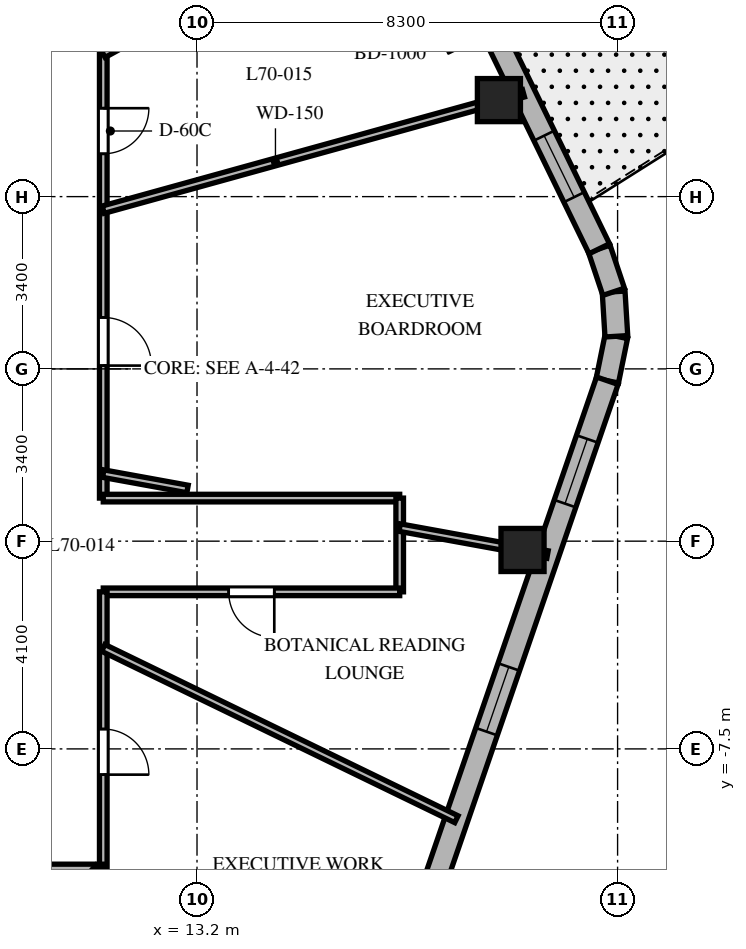
"""IFC4 building model, lengths in metres.
Left out: names, types, materials, properties, quantities, classifications, styles, units other than length and angle.
Written with IfcOpenShell. Run it as: python <this file> out.ifc"""

import sys

from ifc_helpers import new_model, si_unit, direction, frame, frame_2d, origin, origin_2d, place, context, subcontext, project, spatial, rectangle, extrude, element, fill, save


model = new_model("IFC4")
c1 = context("Model", 3, precision=1e-05, world=origin(), true_north=direction((0.0, 1.0)))
c2 = subcontext(c1, "Body", "Model", "MODEL_VIEW")
j1 = project(units=[si_unit("LENGTHUNIT", "METRE"), si_unit("PLANEANGLEUNIT", "RADIAN")], contexts=[c1])
p1 = place(None, origin())
s1 = spatial("IfcSite", under=j1, at=p1, CompositionType="ELEMENT")
p2 = place(p1, origin())
s2 = spatial("IfcBuilding", under=s1, at=p2, CompositionType="ELEMENT")
p3 = place(p2, frame((0.0, 0.0, 280.8)))
s3 = spatial("IfcBuildingStorey", under=s2, at=p3, CompositionType="ELEMENT", Elevation=280.8)
for number, where, z_axis, x_axis in (
    (1, (19.624, -3.574, 0.0), (0.0, 0.0, 1.0), (1.0, 0.0, 0.0)),
    (2, (19.158, 5.305, 0.0), (0.0, 0.0, 1.0), (1.0, 0.0, 0.0)),
):
    element("IfcColumn", number, at=place(p3, frame(where, z_axis=z_axis, x_axis=x_axis)), inside=s3, PredefinedType="COLUMN", context=c2, shape_type="SweptSolid", body=[
        extrude(rectangle(XDim=0.85, YDim=0.85, at=origin_2d()), origin(), (0.0, 0.0, 1.0), 3.9),
    ])
p4 = place(p3, frame((21.298, -0.233, 0.0), z_axis=(0.0, 0.0, 1.0), x_axis=(0.199158176661, 0.979967356941, 0.0)))
e3 = element("IfcWall", 3, at=p4, inside=s3, PredefinedType="SOLIDWALL", context=c2, shape_type="SweptSolid", body=[
    extrude(rectangle(XDim=0.895, YDim=0.45, at=frame_2d((0.447, 0.0))), origin(), (0.0, 0.0, 1.0), 3.6),
])
p5 = place(p3, frame((21.476, 0.644, 0.0), z_axis=(0.0, 0.0, 1.0), x_axis=(-0.061031097918, 0.998135865044, 0.0)))
e4 = element("IfcWall", 4, at=p5, inside=s3, PredefinedType="SOLIDWALL", context=c2, shape_type="SweptSolid", body=[
    extrude(rectangle(XDim=0.88, YDim=0.45, at=frame_2d((0.44, 0.0))), origin(), (0.0, 0.0, 1.0), 3.6),
])
p6 = place(p3, frame((21.422, 1.522, 0.0), z_axis=(0.0, 0.0, 1.0), x_axis=(-0.316964162323, 0.94843751497, 0.0)))
e5 = element("IfcWall", 5, at=p6, inside=s3, PredefinedType="SOLIDWALL", context=c2, shape_type="SweptSolid", body=[
    extrude(rectangle(XDim=0.895, YDim=0.45, at=frame_2d((0.448, 0.0))), origin(), (0.0, 0.0, 1.0), 3.6),
])
p7 = place(p3, frame((15.26, -17.776, 0.0), z_axis=(0.0, 0.0, 1.0), x_axis=(0.325407437101, 0.945573899745, 0.0)))
e6 = element("IfcWall", 6, at=p7, inside=s3, PredefinedType="SOLIDWALL", context=c2, shape_type="SweptSolid", body=[
    extrude(rectangle(XDim=18.552, YDim=0.45, at=frame_2d((9.276, 0.0))), origin(), (0.0, 0.0, 1.0), 3.6),
])
p8 = place(p7, frame((1.161, 0.0, 0.8)))
e7 = element("IfcOpeningElement", 7, at=p8, cuts=e6, PredefinedType="OPENING", context=c2, shape_type="SweptSolid", body=[
    extrude(rectangle(XDim=1.35, YDim=1.75, at=frame_2d((0.675, 0.875))), frame((0.0, 0.235, 0.0), z_axis=(0.0, -1.0, 0.0), x_axis=(1.0, 0.0, 0.0)), (0.0, 0.0, 1.0), 0.47),
])
p9 = place(p7, frame((6.046, 0.0, 0.8)))
e8 = element("IfcOpeningElement", 8, at=p9, cuts=e6, PredefinedType="OPENING", context=c2, shape_type="SweptSolid", body=[
    extrude(rectangle(XDim=1.35, YDim=1.75, at=frame_2d((0.675, 0.875))), frame((0.0, 0.235, 0.0), z_axis=(0.0, -1.0, 0.0), x_axis=(1.0, 0.0, 0.0)), (0.0, 0.0, 1.0), 0.47),
])
p10 = place(p7, frame((11.228, 0.0, 0.8)))
e9 = element("IfcOpeningElement", 9, at=p10, cuts=e6, PredefinedType="OPENING", context=c2, shape_type="SweptSolid", body=[
    extrude(rectangle(XDim=1.35, YDim=1.75, at=frame_2d((0.675, 0.875))), frame((0.0, 0.235, 0.0), z_axis=(0.0, -1.0, 0.0), x_axis=(1.0, 0.0, 0.0)), (0.0, 0.0, 1.0), 0.47),
])
p11 = place(p7, frame((15.987, 0.0, 0.8)))
e10 = element("IfcOpeningElement", 10, at=p11, cuts=e6, PredefinedType="OPENING", context=c2, shape_type="SweptSolid", body=[
    extrude(rectangle(XDim=1.35, YDim=1.75, at=frame_2d((0.675, 0.875))), frame((0.0, 0.235, 0.0), z_axis=(0.0, -1.0, 0.0), x_axis=(1.0, 0.0, 0.0)), (0.0, 0.0, 1.0), 0.47),
])
p12 = place(p3, frame((21.138, 2.371, 0.0), z_axis=(0.0, 0.0, 1.0), x_axis=(-0.438128124058, 0.89891253574, 0.0)))
e11 = element("IfcWall", 11, at=p12, inside=s3, PredefinedType="SOLIDWALL", context=c2, shape_type="SweptSolid", body=[
    extrude(rectangle(XDim=17.565, YDim=0.45, at=frame_2d((8.782, 0.0))), origin(), (0.0, 0.0, 1.0), 3.6),
])
p13 = place(p12, frame((4.769, 0.0, 0.0)))
e12 = element("IfcOpeningElement", 12, at=p13, cuts=e11, PredefinedType="OPENING", context=c2, shape_type="SweptSolid", body=[
    extrude(rectangle(XDim=1.0, YDim=2.15, at=frame_2d((0.5, 1.075))), frame((0.0, 0.235, 0.0), z_axis=(0.0, -1.0, 0.0), x_axis=(1.0, 0.0, 0.0)), (0.0, 0.0, 1.0), 0.47),
])
p14 = place(p12, frame((10.243, 0.0, 0.8)))
e13 = element("IfcOpeningElement", 13, at=p14, cuts=e11, PredefinedType="OPENING", context=c2, shape_type="SweptSolid", body=[
    extrude(rectangle(XDim=1.35, YDim=1.75, at=frame_2d((0.675, 0.875))), frame((0.0, 0.235, 0.0), z_axis=(0.0, -1.0, 0.0), x_axis=(1.0, 0.0, 0.0)), (0.0, 0.0, 1.0), 0.47),
])
p15 = place(p12, frame((15.132, 0.0, 0.8)))
e14 = element("IfcOpeningElement", 14, at=p15, cuts=e11, PredefinedType="OPENING", context=c2, shape_type="SweptSolid", body=[
    extrude(rectangle(XDim=1.35, YDim=1.75, at=frame_2d((0.675, 0.875))), frame((0.0, 0.235, 0.0), z_axis=(0.0, -1.0, 0.0), x_axis=(1.0, 0.0, 0.0)), (0.0, 0.0, 1.0), 0.47),
])
p16 = place(p12, frame((1.133, 0.0, 0.8)))
e15 = element("IfcOpeningElement", 15, at=p16, cuts=e11, PredefinedType="OPENING", context=c2, shape_type="SweptSolid", body=[
    extrude(rectangle(XDim=1.35, YDim=1.75, at=frame_2d((0.675, 0.875))), frame((0.0, 0.235, 0.0), z_axis=(0.0, -1.0, 0.0), x_axis=(1.0, 0.0, 0.0)), (0.0, 0.0, 1.0), 0.47),
])
p17 = place(p3, frame((11.35, 9.85, 0.0), z_axis=(0.0, 0.0, 1.0), x_axis=(0.0, -1.0, 0.0)))
e16 = element("IfcWall", 16, at=p17, inside=s3, PredefinedType="PARTITIONING", context=c2, shape_type="SweptSolid", body=[
    extrude(rectangle(XDim=12.4, YDim=0.15, at=frame_2d((6.2, 0.0))), origin(), (0.0, 0.0, 1.0), 3.09),
])
p18 = place(p17, frame((4.705, 0.0, 0.0)))
e17 = element("IfcOpeningElement", 17, at=p18, cuts=e16, PredefinedType="OPENING", context=c2, shape_type="SweptSolid", body=[
    extrude(rectangle(XDim=0.9, YDim=2.03, at=frame_2d((0.45, 1.015))), frame((0.0, 0.085, 0.0), z_axis=(0.0, -1.0, 0.0), x_axis=(1.0, 0.0, 0.0)), (0.0, 0.0, 1.0), 0.17),
])
p19 = place(p17, frame((1.463, 0.0, 0.0)))
e18 = element("IfcOpeningElement", 18, at=p19, cuts=e16, PredefinedType="OPENING", context=c2, shape_type="SweptSolid", body=[
    extrude(rectangle(XDim=0.95, YDim=2.03, at=frame_2d((0.475, 1.015))), frame((0.0, 0.085, 0.0), z_axis=(0.0, -1.0, 0.0), x_axis=(1.0, 0.0, 0.0)), (0.0, 0.0, 1.0), 0.17),
])
p20 = place(p17, frame((8.835, 0.0, 0.0)))
e19 = element("IfcOpeningElement", 19, at=p20, cuts=e16, PredefinedType="OPENING", context=c2, shape_type="SweptSolid", body=[
    extrude(rectangle(XDim=0.95, YDim=2.03, at=frame_2d((0.475, 1.015))), frame((0.0, 0.085, 0.0), z_axis=(0.0, -1.0, 0.0), x_axis=(1.0, 0.0, 0.0)), (0.0, 0.0, 1.0), 0.17),
])
p21 = place(p3, frame((11.35, -2.55, 0.0), z_axis=(0.0, 0.0, 1.0), x_axis=(1.0, 0.0, 0.0)))
e20 = element("IfcWall", 20, at=p21, inside=s3, PredefinedType="PARTITIONING", context=c2, shape_type="SweptSolid", body=[
    extrude(rectangle(XDim=5.85, YDim=0.15, at=frame_2d((2.925, 0.0))), origin(), (0.0, 0.0, 1.0), 3.041),
])
p22 = place(p3, frame((17.2, -2.55, 0.0), z_axis=(0.0, 0.0, 1.0), x_axis=(0.0, -1.0, 0.0)))
e21 = element("IfcWall", 21, at=p22, inside=s3, PredefinedType="PARTITIONING", context=c2, shape_type="SweptSolid", body=[
    extrude(rectangle(XDim=1.85, YDim=0.15, at=frame_2d((0.925, 0.0))), origin(), (0.0, 0.0, 1.0), 3.09),
])
p23 = place(p3, frame((17.2, -4.4, 0.0), z_axis=(0.0, 0.0, 1.0), x_axis=(-1.0, 0.0, 0.0)))
e22 = element("IfcWall", 22, at=p23, inside=s3, PredefinedType="PARTITIONING", context=c2, shape_type="SweptSolid", body=[
    extrude(rectangle(XDim=5.85, YDim=0.15, at=frame_2d((2.925, 0.0))), origin(), (0.0, 0.0, 1.0), 3.041),
])
p24 = place(p23, frame((2.475, 0.0, 0.0)))
e23 = element("IfcOpeningElement", 23, at=p24, cuts=e22, PredefinedType="OPENING", context=c2, shape_type="SweptSolid", body=[
    extrude(rectangle(XDim=0.9, YDim=2.03, at=frame_2d((0.45, 1.015))), frame((0.0, 0.085, 0.0), z_axis=(0.0, -1.0, 0.0), x_axis=(1.0, 0.0, 0.0)), (0.0, 0.0, 1.0), 0.17),
])
p25 = place(p3, frame((11.35, -4.4, 0.0), z_axis=(0.0, 0.0, 1.0), x_axis=(0.0, -1.0, 0.0)))
e24 = element("IfcWall", 24, at=p25, inside=s3, PredefinedType="PARTITIONING", context=c2, shape_type="SweptSolid", body=[
    extrude(rectangle(XDim=5.45, YDim=0.15, at=frame_2d((2.725, 0.0))), origin(), (0.0, 0.0, 1.0), 3.09),
])
p26 = place(p25, frame((2.708, 0.0, 0.0)))
e25 = element("IfcOpeningElement", 25, at=p26, cuts=e24, PredefinedType="OPENING", context=c2, shape_type="SweptSolid", body=[
    extrude(rectangle(XDim=0.9, YDim=2.03, at=frame_2d((0.45, 1.015))), frame((0.0, 0.085, 0.0), z_axis=(0.0, -1.0, 0.0), x_axis=(1.0, 0.0, 0.0)), (0.0, 0.0, 1.0), 0.17),
])
p27 = place(p3, frame((11.35, -9.85, 0.0), z_axis=(0.0, 0.0, 1.0), x_axis=(-1.0, 0.0, 0.0)))
e26 = element("IfcWall", 26, at=p27, inside=s3, PredefinedType="PARTITIONING", context=c2, shape_type="SweptSolid", body=[
    extrude(rectangle(XDim=10.43, YDim=0.15, at=frame_2d((5.215, 0.0))), origin(), (0.0, 0.0, 1.0), 3.09),
])
p28 = place(p27, frame((8.382, 0.0, 0.0)))
e27 = element("IfcOpeningElement", 27, at=p28, cuts=e26, PredefinedType="OPENING", context=c2, shape_type="SweptSolid", body=[
    extrude(rectangle(XDim=0.95, YDim=2.03, at=frame_2d((0.475, 1.015))), frame((0.0, 0.085, 0.0), z_axis=(0.0, -1.0, 0.0), x_axis=(1.0, 0.0, 0.0)), (0.0, 0.0, 1.0), 0.17),
])
p29 = place(p27, frame((5.75, 0.0, 0.0)))
e28 = element("IfcOpeningElement", 28, at=p29, cuts=e26, PredefinedType="OPENING", context=c2, shape_type="SweptSolid", body=[
    extrude(rectangle(XDim=0.9, YDim=2.03, at=frame_2d((0.45, 1.015))), frame((0.0, 0.085, 0.0), z_axis=(0.0, -1.0, 0.0), x_axis=(1.0, 0.0, 0.0)), (0.0, 0.0, 1.0), 0.17),
])
p30 = place(p27, frame((2.097, 0.0, 0.0)))
e29 = element("IfcOpeningElement", 29, at=p30, cuts=e26, PredefinedType="OPENING", context=c2, shape_type="SweptSolid", body=[
    extrude(rectangle(XDim=0.95, YDim=2.03, at=frame_2d((0.475, 1.015))), frame((0.0, 0.085, 0.0), z_axis=(0.0, -1.0, 0.0), x_axis=(1.0, 0.0, 0.0)), (0.0, 0.0, 1.0), 0.17),
])
p31 = place(p3, frame((11.35, 3.143, 0.0), z_axis=(0.0, 0.0, 1.0), x_axis=(0.963731818141, 0.266872596386, 0.0)))
e30 = element("IfcWall", 30, at=p31, inside=s3, PredefinedType="PARTITIONING", context=c2, shape_type="SweptSolid", body=[
    extrude(rectangle(XDim=8.605, YDim=0.15, at=frame_2d((4.302, 0.0))), origin(), (0.0, 0.0, 1.0), 2.94),
])
p32 = place(p3, frame((11.35, 6.213, 0.0), z_axis=(0.0, 0.0, 1.0), x_axis=(0.877157109774, 0.480203503499, 0.0)))
e31 = element("IfcWall", 31, at=p32, inside=s3, PredefinedType="PARTITIONING", context=c2, shape_type="SweptSolid", body=[
    extrude(rectangle(XDim=7.123, YDim=0.15, at=frame_2d((3.562, 0.0))), origin(), (0.0, 0.0, 1.0), 2.94),
])
p33 = place(p3, frame((6.446, -9.85, 0.0), z_axis=(0.0, 0.0, 1.0), x_axis=(0.547598105704, -0.836741486141, 0.0)))
e32 = element("IfcWall", 32, at=p33, inside=s3, PredefinedType="PARTITIONING", context=c2, shape_type="SweptSolid", body=[
    extrude(rectangle(XDim=11.806, YDim=0.15, at=frame_2d((5.903, 0.0))), origin(), (0.0, 0.0, 1.0), 2.94),
])
p34 = place(p3, frame((11.157, -9.85, 0.0), z_axis=(0.0, 0.0, 1.0), x_axis=(0.74966962095, -0.661812253909, 0.0)))
e33 = element("IfcWall", 33, at=p34, inside=s3, PredefinedType="PARTITIONING", context=c2, shape_type="SweptSolid", body=[
    extrude(rectangle(XDim=6.989, YDim=0.15, at=frame_2d((3.494, 0.0))), origin(), (0.0, 0.0, 1.0), 2.94),
])
p35 = place(p3, frame((11.35, -5.507, 0.0), z_axis=(0.0, 0.0, 1.0), x_axis=(0.899708724615, -0.436490791256, 0.0)))
e34 = element("IfcWall", 34, at=p35, inside=s3, PredefinedType="PARTITIONING", context=c2, shape_type="SweptSolid", body=[
    extrude(rectangle(XDim=7.746, YDim=0.15, at=frame_2d((3.873, 0.0))), origin(), (0.0, 0.0, 1.0), 2.94),
])
p36 = place(p3, frame((11.35, -2.067, 0.0), z_axis=(0.0, 0.0, 1.0), x_axis=(0.983807459651, -0.179228575665, 0.0)))
e35 = element("IfcWall", 35, at=p36, inside=s3, PredefinedType="PARTITIONING", context=c2, shape_type="SweptSolid", body=[
    extrude(rectangle(XDim=1.69, YDim=0.15, at=frame_2d((0.845, 0.0))), origin(), (0.0, 0.0, 1.0), 3.6),
])
p37 = place(p3, frame((17.2, -3.133, 0.0), z_axis=(0.0, 0.0, 1.0), x_axis=(0.983817168797, -0.179175272791, 0.0)))
e36 = element("IfcWall", 36, at=p37, inside=s3, PredefinedType="PARTITIONING", context=c2, shape_type="SweptSolid", body=[
    extrude(rectangle(XDim=2.965, YDim=0.15, at=frame_2d((1.482, 0.0))), origin(), (0.0, 0.0, 1.0), 2.94),
])
p38 = place(p10, origin())
e37 = element("IfcWindow", 37, at=p38, inside=s3, PartitioningType="SINGLE_PANEL", PredefinedType="WINDOW", context=c2, shape_type="SweptSolid", body=[
    extrude(rectangle(XDim=1.35, YDim=1.75, at=frame_2d((0.675, 0.875))), frame((0.0, 0.03, 0.0), z_axis=(0.0, -1.0, 0.0), x_axis=(1.0, 0.0, 0.0)), (0.0, 0.0, 1.0), 0.06),
])
fill(e9, e37)
p39 = place(p11, origin())
e38 = element("IfcWindow", 38, at=p39, inside=s3, PartitioningType="SINGLE_PANEL", PredefinedType="WINDOW", context=c2, shape_type="SweptSolid", body=[
    extrude(rectangle(XDim=1.35, YDim=1.75, at=frame_2d((0.675, 0.875))), frame((0.0, 0.03, 0.0), z_axis=(0.0, -1.0, 0.0), x_axis=(1.0, 0.0, 0.0)), (0.0, 0.0, 1.0), 0.06),
])
fill(e10, e38)
p40 = place(p16, origin())
e39 = element("IfcWindow", 39, at=p40, inside=s3, PartitioningType="SINGLE_PANEL", PredefinedType="WINDOW", context=c2, shape_type="SweptSolid", body=[
    extrude(rectangle(XDim=1.35, YDim=1.75, at=frame_2d((0.675, 0.875))), frame((0.0, 0.03, 0.0), z_axis=(0.0, -1.0, 0.0), x_axis=(1.0, 0.0, 0.0)), (0.0, 0.0, 1.0), 0.06),
])
fill(e15, e39)
p41 = place(p18, origin())
e40 = element("IfcDoor", 40, at=p41, inside=s3, OperationType="SINGLE_SWING_LEFT", PredefinedType="DOOR", context=c2, shape_type="SweptSolid", body=[
    extrude(rectangle(XDim=0.9, YDim=2.03, at=frame_2d((0.45, 1.015))), frame((0.0, 0.025, 0.0), z_axis=(0.0, -1.0, 0.0), x_axis=(1.0, 0.0, 0.0)), (0.0, 0.0, 1.0), 0.05),
])
fill(e17, e40)
p42 = place(p26, origin())
e41 = element("IfcDoor", 41, at=p42, inside=s3, OperationType="SINGLE_SWING_RIGHT", PredefinedType="DOOR", context=c2, shape_type="SweptSolid", body=[
    extrude(rectangle(XDim=0.9, YDim=2.03, at=frame_2d((0.45, 1.015))), frame((0.0, 0.025, 0.0), z_axis=(0.0, -1.0, 0.0), x_axis=(1.0, 0.0, 0.0)), (0.0, 0.0, 1.0), 0.05),
])
fill(e25, e41)
p43 = place(p24, origin())
e42 = element("IfcDoor", 42, at=p43, inside=s3, OperationType="SINGLE_SWING_LEFT", PredefinedType="DOOR", context=c2, shape_type="SweptSolid", body=[
    extrude(rectangle(XDim=0.9, YDim=2.03, at=frame_2d((0.45, 1.015))), frame((0.0, 0.025, 0.0), z_axis=(0.0, -1.0, 0.0), x_axis=(1.0, 0.0, 0.0)), (0.0, 0.0, 1.0), 0.05),
])
fill(e23, e42)
p44 = place(p20, origin())
e43 = element("IfcDoor", 43, at=p44, inside=s3, OperationType="SINGLE_SWING_RIGHT", PredefinedType="DOOR", context=c2, shape_type="SweptSolid", body=[
    extrude(rectangle(XDim=0.95, YDim=2.03, at=frame_2d((0.475, 1.015))), frame((0.0, 0.025, 0.0), z_axis=(0.0, -1.0, 0.0), x_axis=(1.0, 0.0, 0.0)), (0.0, 0.0, 1.0), 0.05),
])
fill(e19, e43)
save(model, sys.argv[1])
